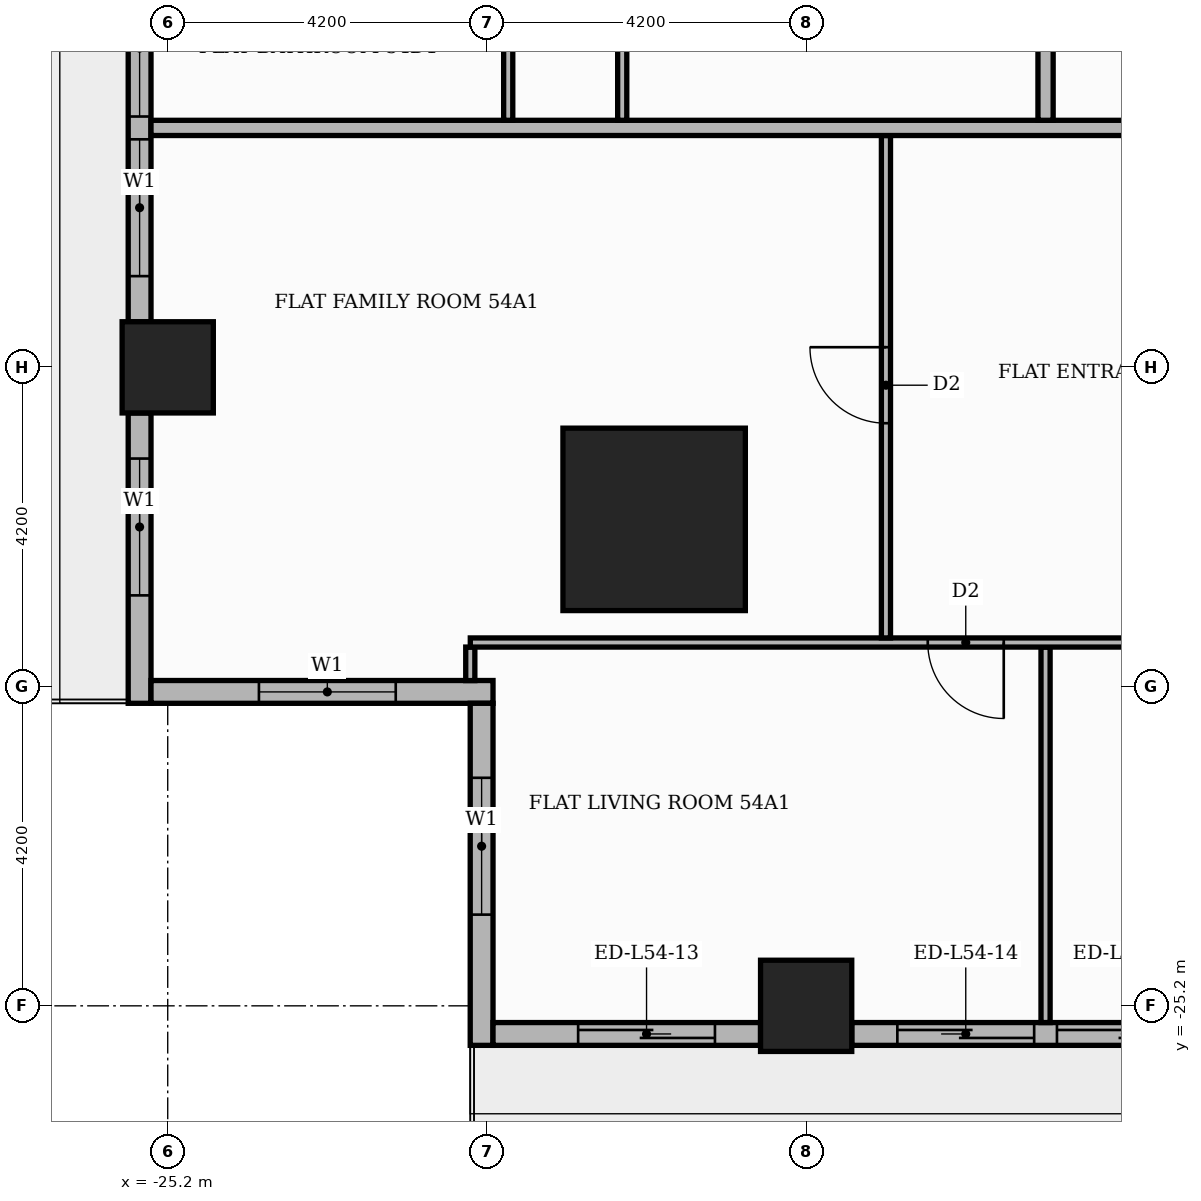
"""IFC4 building model, lengths in metres.
Left out: names, types, materials, properties, quantities, classifications, styles, units other than length and angle.
Written with IfcOpenShell. Run it as: python <this file> out.ifc"""

import sys

from ifc_helpers import new_model, si_unit, direction, frame, frame_2d, origin, origin_2d, place, context, subcontext, project, spatial, rectangle, extrude, element, fill, save


model = new_model("IFC4")
c1 = context("Model", 3, precision=1e-05, world=origin(), true_north=direction((0.0, 1.0)))
c2 = subcontext(c1, "Body", "Model", "MODEL_VIEW")
j1 = project(units=[si_unit("LENGTHUNIT", "METRE"), si_unit("PLANEANGLEUNIT", "RADIAN")], contexts=[c1])
p1 = place(None, origin())
s1 = spatial("IfcSite", under=j1, at=p1, CompositionType="ELEMENT")
p2 = place(p1, origin())
s2 = spatial("IfcBuilding", under=s1, at=p2, CompositionType="ELEMENT")
p3 = place(p2, frame((0.0, 0.0, 227.4)))
s3 = spatial("IfcBuildingStorey", under=s2, at=p3, CompositionType="ELEMENT", Elevation=227.4)
p4 = place(p3, frame((-18.8, -18.8, 0.0), z_axis=(0.0, 0.0, 1.0), x_axis=(1.0, 0.0, 0.0)))
e1 = element("IfcColumn", 1, at=p4, inside=s3, PredefinedType="COLUMN", context=c2, shape_type="SweptSolid", body=[
    extrude(rectangle(XDim=2.4, YDim=2.4, at=origin_2d()), origin(), (0.0, 0.0, 1.0), 3.9),
])
for number, where, z_axis, x_axis in (
    (2, (-16.8, -25.2, 0.0), (0.0, 0.0, 1.0), (1.0, 0.0, 0.0)),
    (3, (-25.2, -16.8, 0.0), (0.0, 0.0, 1.0), (1.0, 0.0, 0.0)),
):
    element("IfcColumn", number, at=place(p3, frame(where, z_axis=z_axis, x_axis=x_axis)), inside=s3, PredefinedType="COLUMN", context=c2, shape_type="SweptSolid", body=[
        extrude(rectangle(XDim=1.2, YDim=1.2, at=origin_2d()), origin(), (0.0, 0.0, 1.0), 3.9),
    ])
p5 = place(p3, frame((-25.57, -9.0, 0.0), z_axis=(0.0, 0.0, 1.0), x_axis=(0.0, -1.0, 0.0)))
e4 = element("IfcWall", 4, at=p5, inside=s3, PredefinedType="STANDARD", context=c2, shape_type="SweptSolid", body=[
    extrude(rectangle(XDim=7.2, YDim=0.3, at=frame_2d((3.6, 0.0))), origin(), (0.0, 0.0, 1.0), 3.48),
])
p6 = place(p5, frame((0.6, 0.0, 0.9)))
e5 = element("IfcOpeningElement", 5, at=p6, cuts=e4, PredefinedType="OPENING", context=c2, shape_type="SweptSolid", body=[
    extrude(rectangle(XDim=1.8, YDim=2.1, at=frame_2d((0.9, 1.05))), frame((0.0, 0.16, 0.0), z_axis=(0.0, -1.0, 0.0), x_axis=(1.0, 0.0, 0.0)), (0.0, 0.0, 1.0), 0.32),
])
p7 = place(p5, frame((2.7, 0.0, 0.9)))
e6 = element("IfcOpeningElement", 6, at=p7, cuts=e4, PredefinedType="OPENING", context=c2, shape_type="SweptSolid", body=[
    extrude(rectangle(XDim=1.8, YDim=2.1, at=frame_2d((0.9, 1.05))), frame((0.0, 0.16, 0.0), z_axis=(0.0, -1.0, 0.0), x_axis=(1.0, 0.0, 0.0)), (0.0, 0.0, 1.0), 0.32),
])
p8 = place(p5, frame((4.8, 0.0, 0.9)))
e7 = element("IfcOpeningElement", 7, at=p8, cuts=e4, PredefinedType="OPENING", context=c2, shape_type="SweptSolid", body=[
    extrude(rectangle(XDim=1.8, YDim=2.1, at=frame_2d((0.9, 1.05))), frame((0.0, 0.16, 0.0), z_axis=(0.0, -1.0, 0.0), x_axis=(1.0, 0.0, 0.0)), (0.0, 0.0, 1.0), 0.32),
])
p9 = place(p3, frame((-25.57, -17.4, 0.0), z_axis=(0.0, 0.0, 1.0), x_axis=(0.0, -1.0, 0.0)))
e8 = element("IfcWall", 8, at=p9, inside=s3, PredefinedType="STANDARD", context=c2, shape_type="SweptSolid", body=[
    extrude(rectangle(XDim=3.82, YDim=0.3, at=frame_2d((1.91, 0.0))), origin(), (0.0, 0.0, 1.0), 3.48),
])
p10 = place(p9, frame((0.6, 0.0, 0.9)))
e9 = element("IfcOpeningElement", 9, at=p10, cuts=e8, PredefinedType="OPENING", context=c2, shape_type="SweptSolid", body=[
    extrude(rectangle(XDim=1.8, YDim=2.1, at=frame_2d((0.9, 1.05))), frame((0.0, 0.16, 0.0), z_axis=(0.0, -1.0, 0.0), x_axis=(1.0, 0.0, 0.0)), (0.0, 0.0, 1.0), 0.32),
])
p11 = place(p3, frame((-25.42, -21.07, 0.0), z_axis=(0.0, 0.0, 1.0), x_axis=(1.0, 0.0, 0.0)))
e10 = element("IfcWall", 10, at=p11, inside=s3, PredefinedType="STANDARD", context=c2, shape_type="SweptSolid", body=[
    extrude(rectangle(XDim=4.5, YDim=0.3, at=frame_2d((2.25, 0.0))), origin(), (0.0, 0.0, 1.0), 3.48),
])
p12 = place(p11, frame((1.42, 0.0, 0.9)))
e11 = element("IfcOpeningElement", 11, at=p12, cuts=e10, PredefinedType="OPENING", context=c2, shape_type="SweptSolid", body=[
    extrude(rectangle(XDim=1.8, YDim=2.1, at=frame_2d((0.9, 1.05))), frame((0.0, 0.16, 0.0), z_axis=(0.0, -1.0, 0.0), x_axis=(1.0, 0.0, 0.0)), (0.0, 0.0, 1.0), 0.32),
])
p13 = place(p3, frame((-21.07, -21.22, 0.0), z_axis=(0.0, 0.0, 1.0), x_axis=(0.0, -1.0, 0.0)))
e12 = element("IfcWall", 12, at=p13, inside=s3, PredefinedType="STANDARD", context=c2, shape_type="SweptSolid", body=[
    extrude(rectangle(XDim=4.5, YDim=0.3, at=frame_2d((2.25, 0.0))), origin(), (0.0, 0.0, 1.0), 3.48),
])
p14 = place(p13, frame((0.98, 0.0, 0.9)))
e13 = element("IfcOpeningElement", 13, at=p14, cuts=e12, PredefinedType="OPENING", context=c2, shape_type="SweptSolid", body=[
    extrude(rectangle(XDim=1.8, YDim=2.1, at=frame_2d((0.9, 1.05))), frame((0.0, 0.16, 0.0), z_axis=(0.0, -1.0, 0.0), x_axis=(1.0, 0.0, 0.0)), (0.0, 0.0, 1.0), 0.32),
])
p15 = place(p3, frame((-20.92, -25.57, 0.0), z_axis=(0.0, 0.0, 1.0), x_axis=(1.0, 0.0, 0.0)))
e14 = element("IfcWall", 14, at=p15, inside=s3, PredefinedType="STANDARD", context=c2, shape_type="SweptSolid", body=[
    extrude(rectangle(XDim=3.52, YDim=0.3, at=frame_2d((1.76, 0.0))), origin(), (0.0, 0.0, 1.0), 3.48),
])
p16 = place(p15, frame((1.12, 0.0, 0.0)))
e15 = element("IfcOpeningElement", 15, at=p16, cuts=e14, PredefinedType="OPENING", context=c2, shape_type="SweptSolid", body=[
    extrude(rectangle(XDim=1.8, YDim=2.4, at=frame_2d((0.9, 1.2))), frame((0.0, 0.16, 0.0), z_axis=(0.0, -1.0, 0.0), x_axis=(1.0, 0.0, 0.0)), (0.0, 0.0, 1.0), 0.32),
])
p17 = place(p3, frame((-16.2, -25.57, 0.0), z_axis=(0.0, 0.0, 1.0), x_axis=(1.0, 0.0, 0.0)))
e16 = element("IfcWall", 16, at=p17, inside=s3, PredefinedType="STANDARD", context=c2, shape_type="SweptSolid", body=[
    extrude(rectangle(XDim=7.2, YDim=0.3, at=frame_2d((3.6, 0.0))), origin(), (0.0, 0.0, 1.0), 3.48),
])
p18 = place(p17, frame((0.6, 0.0, 0.0)))
e17 = element("IfcOpeningElement", 17, at=p18, cuts=e16, PredefinedType="OPENING", context=c2, shape_type="SweptSolid", body=[
    extrude(rectangle(XDim=1.8, YDim=2.4, at=frame_2d((0.9, 1.2))), frame((0.0, 0.16, 0.0), z_axis=(0.0, -1.0, 0.0), x_axis=(1.0, 0.0, 0.0)), (0.0, 0.0, 1.0), 0.32),
])
p19 = place(p17, frame((2.7, 0.0, 0.0)))
e18 = element("IfcOpeningElement", 18, at=p19, cuts=e16, PredefinedType="OPENING", context=c2, shape_type="SweptSolid", body=[
    extrude(rectangle(XDim=1.8, YDim=2.4, at=frame_2d((0.9, 1.2))), frame((0.0, 0.16, 0.0), z_axis=(0.0, -1.0, 0.0), x_axis=(1.0, 0.0, 0.0)), (0.0, 0.0, 1.0), 0.32),
])
p20 = place(p17, frame((4.8, 0.0, 0.9)))
e19 = element("IfcOpeningElement", 19, at=p20, cuts=e16, PredefinedType="OPENING", context=c2, shape_type="SweptSolid", body=[
    extrude(rectangle(XDim=1.8, YDim=2.1, at=frame_2d((0.9, 1.05))), frame((0.0, 0.16, 0.0), z_axis=(0.0, -1.0, 0.0), x_axis=(1.0, 0.0, 0.0)), (0.0, 0.0, 1.0), 0.32),
])
p21 = place(p3, frame((-13.65, -25.42, 0.0), z_axis=(0.0, 0.0, 1.0), x_axis=(0.0, 1.0, 0.0)))
e20 = element("IfcWall", 20, at=p21, inside=s3, PredefinedType="PARTITIONING", context=c2, shape_type="SweptSolid", body=[
    extrude(rectangle(XDim=4.94, YDim=0.12, at=frame_2d((2.47, 0.0))), origin(), (0.0, 0.0, 1.0), 3.48),
])
p22 = place(p3, frame((-21.219, -20.921, 0.0), z_axis=(0.0, 0.0, 1.0), x_axis=(0.0, 1.0, 0.0)))
e21 = element("IfcWall", 21, at=p22, inside=s3, PredefinedType="PARTITIONING", context=c2, shape_type="SweptSolid", body=[
    extrude(rectangle(XDim=0.441, YDim=0.12, at=frame_2d((0.22, 0.0))), origin(), (0.0, 0.0, 1.0), 3.48),
])
p23 = place(p3, frame((-21.219, -20.42, 0.0), z_axis=(0.0, 0.0, 1.0), x_axis=(1.0, 0.0, 0.0)))
e22 = element("IfcWall", 22, at=p23, inside=s3, PredefinedType="PARTITIONING", context=c2, shape_type="SweptSolid", body=[
    extrude(rectangle(XDim=15.869, YDim=0.12, at=frame_2d((7.935, 0.0))), origin(), (0.0, 0.0, 1.0), 3.48),
])
p24 = place(p23, frame((6.019, 0.0, 0.0)))
e23 = element("IfcOpeningElement", 23, at=p24, cuts=e22, PredefinedType="OPENING", context=c2, shape_type="SweptSolid", body=[
    extrude(rectangle(XDim=1.0, YDim=2.1, at=frame_2d((0.5, 1.05))), frame((0.0, 0.07, 0.0), z_axis=(0.0, -1.0, 0.0), x_axis=(1.0, 0.0, 0.0)), (0.0, 0.0, 1.0), 0.14),
])
p25 = place(p23, frame((9.219, 0.0, 0.0)))
e24 = element("IfcOpeningElement", 24, at=p25, cuts=e22, PredefinedType="OPENING", context=c2, shape_type="SweptSolid", body=[
    extrude(rectangle(XDim=0.9, YDim=2.1, at=frame_2d((0.45, 1.05))), frame((0.0, 0.07, 0.0), z_axis=(0.0, -1.0, 0.0), x_axis=(1.0, 0.0, 0.0)), (0.0, 0.0, 1.0), 0.14),
])
p26 = place(p3, frame((-15.75, -20.36, 0.0), z_axis=(0.0, 0.0, 1.0), x_axis=(0.0, 1.0, 0.0)))
e25 = element("IfcWall", 25, at=p26, inside=s3, PredefinedType="PARTITIONING", context=c2, shape_type="SweptSolid", body=[
    extrude(rectangle(XDim=6.61, YDim=0.12, at=frame_2d((3.305, 0.0))), origin(), (0.0, 0.0, 1.0), 3.48),
])
p27 = place(p26, frame((2.825, 0.0, 0.0)))
e26 = element("IfcOpeningElement", 26, at=p27, cuts=e25, PredefinedType="OPENING", context=c2, shape_type="SweptSolid", body=[
    extrude(rectangle(XDim=1.0, YDim=2.1, at=frame_2d((0.5, 1.05))), frame((0.0, 0.07, 0.0), z_axis=(0.0, -1.0, 0.0), x_axis=(1.0, 0.0, 0.0)), (0.0, 0.0, 1.0), 0.14),
])
p28 = place(p3, frame((-25.42, -13.65, 0.0), z_axis=(0.0, 0.0, 1.0), x_axis=(1.0, 0.0, 0.0)))
e27 = element("IfcWall", 27, at=p28, inside=s3, PredefinedType="PARTITIONING", context=c2, shape_type="SweptSolid", body=[
    extrude(rectangle(XDim=39.07, YDim=0.2, at=frame_2d((19.535, 0.0))), origin(), (0.0, 0.0, 1.0), 3.48),
])
p29 = place(p28, frame((13.32, 0.0, 0.0)))
e28 = element("IfcOpeningElement", 28, at=p29, cuts=e27, PredefinedType="OPENING", context=c2, shape_type="SweptSolid", body=[
    extrude(rectangle(XDim=1.1, YDim=2.4, at=frame_2d((0.55, 1.2))), frame((0.0, 0.11, 0.0), z_axis=(0.0, -1.0, 0.0), x_axis=(1.0, 0.0, 0.0)), (0.0, 0.0, 1.0), 0.22),
])
p30 = place(p28, frame((23.82, 0.0, 0.0)))
e29 = element("IfcOpeningElement", 29, at=p30, cuts=e27, PredefinedType="OPENING", context=c2, shape_type="SweptSolid", body=[
    extrude(rectangle(XDim=1.1, YDim=2.4, at=frame_2d((0.55, 1.2))), frame((0.0, 0.11, 0.0), z_axis=(0.0, -1.0, 0.0), x_axis=(1.0, 0.0, 0.0)), (0.0, 0.0, 1.0), 0.22),
])
p31 = place(p3, frame((-20.72, -13.55, 0.0), z_axis=(0.0, 0.0, 1.0), x_axis=(0.0, 1.0, 0.0)))
e30 = element("IfcWall", 30, at=p31, inside=s3, PredefinedType="PARTITIONING", context=c2, shape_type="SweptSolid", body=[
    extrude(rectangle(XDim=1.94, YDim=0.12, at=frame_2d((0.97, 0.0))), origin(), (0.0, 0.0, 1.0), 3.48),
])
p32 = place(p3, frame((-19.22, -13.55, 0.0), z_axis=(0.0, 0.0, 1.0), x_axis=(0.0, 1.0, 0.0)))
e31 = element("IfcWall", 31, at=p32, inside=s3, PredefinedType="PARTITIONING", context=c2, shape_type="SweptSolid", body=[
    extrude(rectangle(XDim=3.74, YDim=0.12, at=frame_2d((1.87, 0.0))), origin(), (0.0, 0.0, 1.0), 3.48),
])
p33 = place(p32, frame((1.4, 0.0, 0.0)))
e32 = element("IfcOpeningElement", 32, at=p33, cuts=e31, PredefinedType="OPENING", context=c2, shape_type="SweptSolid", body=[
    extrude(rectangle(XDim=0.9, YDim=2.1, at=frame_2d((0.45, 1.05))), frame((0.0, 0.07, 0.0), z_axis=(0.0, -1.0, 0.0), x_axis=(1.0, 0.0, 0.0)), (0.0, 0.0, 1.0), 0.14),
])
p34 = place(p3, frame((-13.65, -13.55, 0.0), z_axis=(0.0, 0.0, 1.0), x_axis=(0.0, 1.0, 0.0)))
e33 = element("IfcWall", 33, at=p34, inside=s3, PredefinedType="PARTITIONING", context=c2, shape_type="SweptSolid", body=[
    extrude(rectangle(XDim=27.1, YDim=0.2, at=frame_2d((13.55, 0.0))), origin(), (0.0, 0.0, 1.0), 3.48),
])
p35 = place(p34, frame((24.55, 0.0, 0.0)))
e34 = element("IfcOpeningElement", 34, at=p35, cuts=e33, PredefinedType="OPENING", context=c2, shape_type="SweptSolid", body=[
    extrude(rectangle(XDim=1.1, YDim=2.4, at=frame_2d((0.55, 1.2))), frame((0.0, 0.11, 0.0), z_axis=(0.0, -1.0, 0.0), x_axis=(1.0, 0.0, 0.0)), (0.0, 0.0, 1.0), 0.22),
])
p36 = place(p7, origin())
e35 = element("IfcWindow", 35, at=p36, inside=s3, PartitioningType="SINGLE_PANEL", PredefinedType="WINDOW", context=c2, shape_type="SweptSolid", body=[
    extrude(rectangle(XDim=1.8, YDim=2.1, at=frame_2d((0.9, 1.05))), frame((0.0, 0.03, 0.0), z_axis=(0.0, -1.0, 0.0), x_axis=(1.0, 0.0, 0.0)), (0.0, 0.0, 1.0), 0.06),
])
fill(e6, e35)
p37 = place(p8, origin())
e36 = element("IfcWindow", 36, at=p37, inside=s3, PartitioningType="SINGLE_PANEL", PredefinedType="WINDOW", context=c2, shape_type="SweptSolid", body=[
    extrude(rectangle(XDim=1.8, YDim=2.1, at=frame_2d((0.9, 1.05))), frame((0.0, 0.03, 0.0), z_axis=(0.0, -1.0, 0.0), x_axis=(1.0, 0.0, 0.0)), (0.0, 0.0, 1.0), 0.06),
])
fill(e7, e36)
p38 = place(p10, origin())
e37 = element("IfcWindow", 37, at=p38, inside=s3, PartitioningType="SINGLE_PANEL", PredefinedType="WINDOW", context=c2, shape_type="SweptSolid", body=[
    extrude(rectangle(XDim=1.8, YDim=2.1, at=frame_2d((0.9, 1.05))), frame((0.0, 0.03, 0.0), z_axis=(0.0, -1.0, 0.0), x_axis=(1.0, 0.0, 0.0)), (0.0, 0.0, 1.0), 0.06),
])
fill(e9, e37)
p39 = place(p12, origin())
e38 = element("IfcWindow", 38, at=p39, inside=s3, PartitioningType="SINGLE_PANEL", PredefinedType="WINDOW", context=c2, shape_type="SweptSolid", body=[
    extrude(rectangle(XDim=1.8, YDim=2.1, at=frame_2d((0.9, 1.05))), frame((0.0, 0.03, 0.0), z_axis=(0.0, -1.0, 0.0), x_axis=(1.0, 0.0, 0.0)), (0.0, 0.0, 1.0), 0.06),
])
fill(e11, e38)
p40 = place(p14, origin())
e39 = element("IfcWindow", 39, at=p40, inside=s3, PartitioningType="SINGLE_PANEL", PredefinedType="WINDOW", context=c2, shape_type="SweptSolid", body=[
    extrude(rectangle(XDim=1.8, YDim=2.1, at=frame_2d((0.9, 1.05))), frame((0.0, 0.03, 0.0), z_axis=(0.0, -1.0, 0.0), x_axis=(1.0, 0.0, 0.0)), (0.0, 0.0, 1.0), 0.06),
])
fill(e13, e39)
p41 = place(p16, origin())
e40 = element("IfcDoor", 40, at=p41, inside=s3, OperationType="SLIDING_TO_RIGHT", PredefinedType="DOOR", context=c2, shape_type="SweptSolid", body=[
    extrude(rectangle(XDim=1.8, YDim=2.4, at=frame_2d((0.9, 1.2))), frame((0.0, 0.025, 0.0), z_axis=(0.0, -1.0, 0.0), x_axis=(1.0, 0.0, 0.0)), (0.0, 0.0, 1.0), 0.05),
])
fill(e15, e40)
p42 = place(p18, origin())
e41 = element("IfcDoor", 41, at=p42, inside=s3, OperationType="SLIDING_TO_LEFT", PredefinedType="DOOR", context=c2, shape_type="SweptSolid", body=[
    extrude(rectangle(XDim=1.8, YDim=2.4, at=frame_2d((0.9, 1.2))), frame((0.0, 0.025, 0.0), z_axis=(0.0, -1.0, 0.0), x_axis=(1.0, 0.0, 0.0)), (0.0, 0.0, 1.0), 0.05),
])
fill(e17, e41)
p43 = place(p19, origin())
e42 = element("IfcDoor", 42, at=p43, inside=s3, OperationType="SLIDING_TO_RIGHT", PredefinedType="DOOR", context=c2, shape_type="SweptSolid", body=[
    extrude(rectangle(XDim=1.8, YDim=2.4, at=frame_2d((0.9, 1.2))), frame((0.0, 0.025, 0.0), z_axis=(0.0, -1.0, 0.0), x_axis=(1.0, 0.0, 0.0)), (0.0, 0.0, 1.0), 0.05),
])
fill(e18, e42)
p44 = place(p27, origin())
e43 = element("IfcDoor", 43, at=p44, inside=s3, OperationType="SINGLE_SWING_RIGHT", PredefinedType="DOOR", context=c2, shape_type="SweptSolid", body=[
    extrude(rectangle(XDim=1.0, YDim=2.1, at=frame_2d((0.5, 1.05))), frame((0.0, 0.025, 0.0), z_axis=(0.0, -1.0, 0.0), x_axis=(1.0, 0.0, 0.0)), (0.0, 0.0, 1.0), 0.05),
])
fill(e26, e43)
p45 = place(p24, frame((1.0, 0.0, 0.0), z_axis=(0.0, 0.0, 1.0), x_axis=(-1.0, 0.0, 0.0)))
e44 = element("IfcDoor", 44, at=p45, inside=s3, OperationType="SINGLE_SWING_RIGHT", PredefinedType="DOOR", context=c2, shape_type="SweptSolid", body=[
    extrude(rectangle(XDim=1.0, YDim=2.1, at=frame_2d((0.5, 1.05))), frame((0.0, 0.025, 0.0), z_axis=(0.0, -1.0, 0.0), x_axis=(1.0, 0.0, 0.0)), (0.0, 0.0, 1.0), 0.05),
])
fill(e23, e44)
save(model, sys.argv[1])
